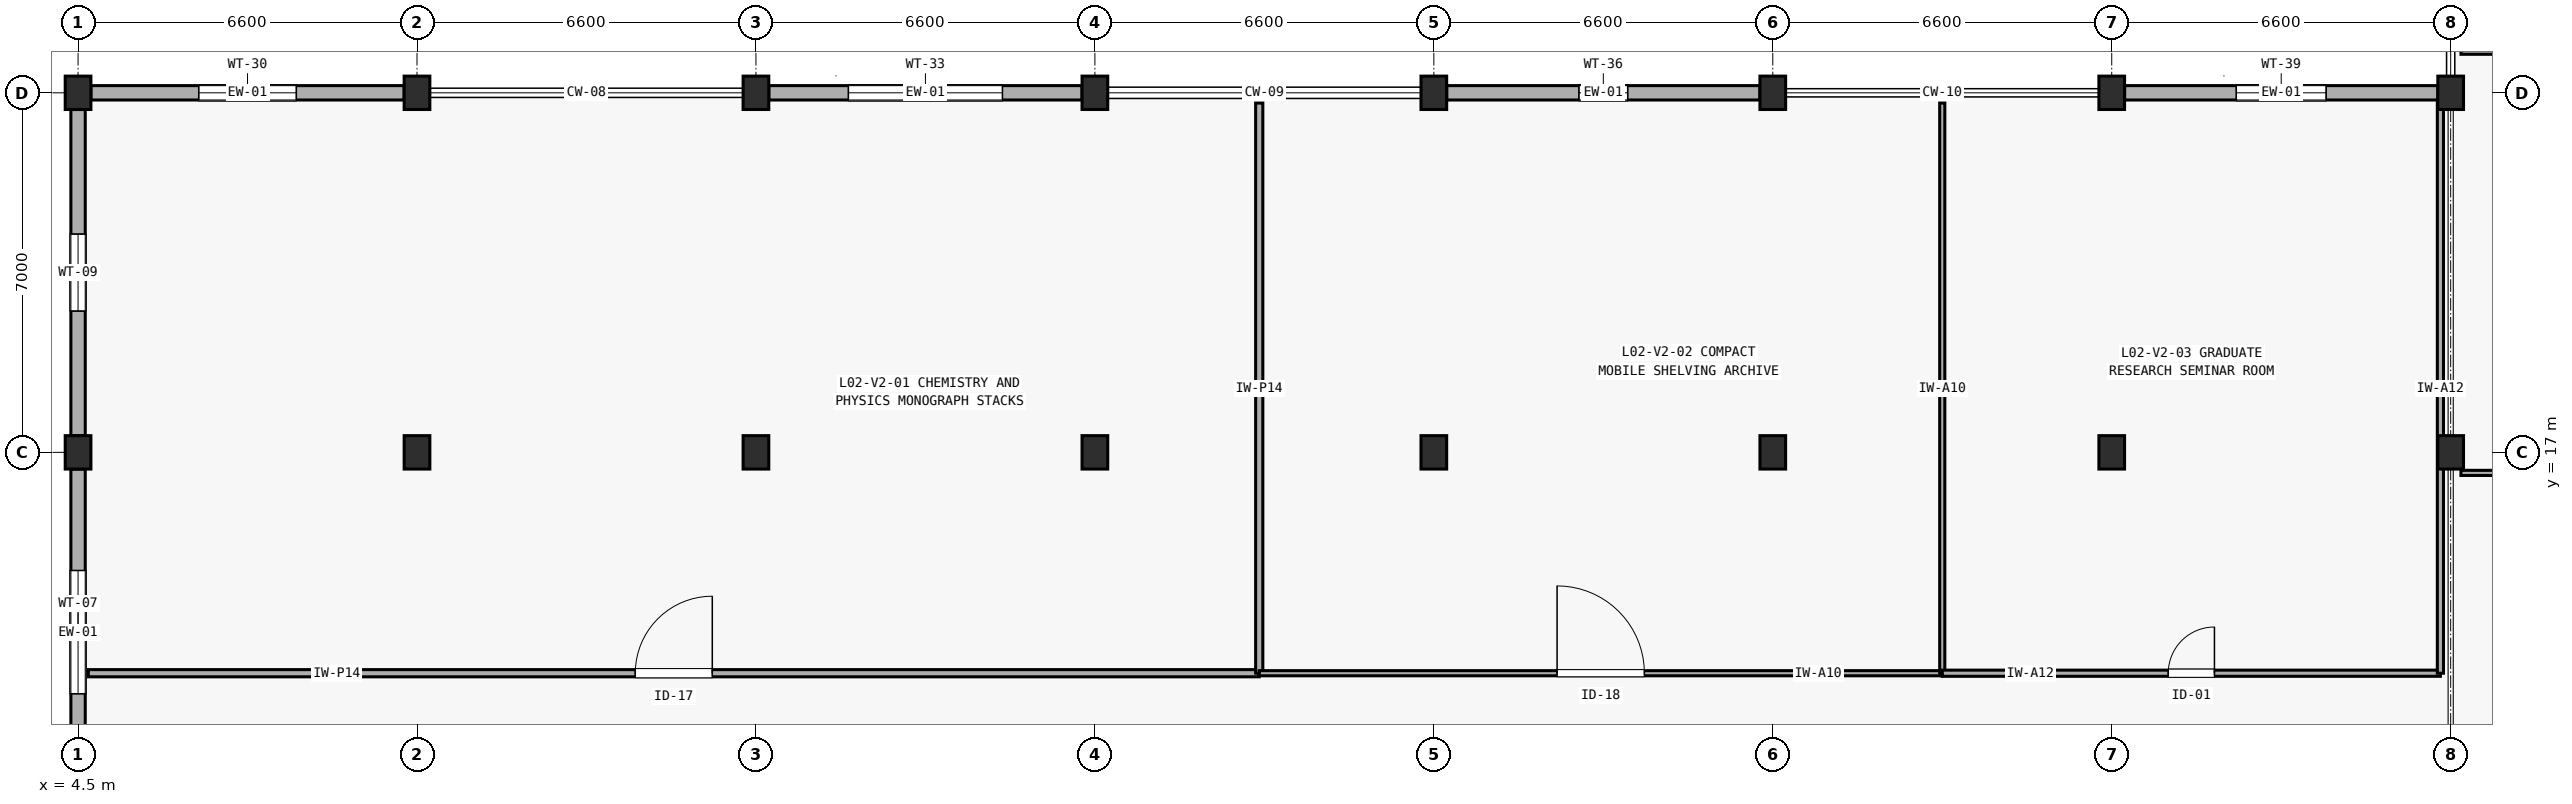
"""IFC4 building model, lengths in metres.
Left out: names, types, materials, properties, quantities, classifications, styles, units other than length and angle.
Written with IfcOpenShell. Run it as: python <this file> out.ifc"""

import sys

from ifc_helpers import new_model, si_unit, direction, frame, frame_2d, origin, origin_2d, place, context, subcontext, project, spatial, rectangle, extrude, element, fill, save


model = new_model("IFC4")
c1 = context("Model", 3, precision=1e-05, world=origin(), true_north=direction((0.0, 1.0)))
c2 = subcontext(c1, "Body", "Model", "MODEL_VIEW")
j1 = project(units=[si_unit("LENGTHUNIT", "METRE"), si_unit("PLANEANGLEUNIT", "RADIAN")], contexts=[c1])
p1 = place(None, origin())
s1 = spatial("IfcSite", under=j1, at=p1, CompositionType="ELEMENT")
p2 = place(p1, origin())
s2 = spatial("IfcBuilding", under=s1, at=p2, CompositionType="ELEMENT")
p3 = place(p2, frame((0.0, 0.0, 8.4)))
s3 = spatial("IfcBuildingStorey", under=s2, at=p3, CompositionType="ELEMENT", Elevation=8.4)
for number, where, z_axis, x_axis in (
    (1, (4.5, 17.0, 0.0), (0.0, 0.0, 1.0), (1.0, 0.0, 0.0)),
    (2, (4.5, 24.0, 0.0), (0.0, 0.0, 1.0), (1.0, 0.0, 0.0)),
    (3, (11.1, 17.0, 0.0), (0.0, 0.0, 1.0), (1.0, 0.0, 0.0)),
    (4, (11.1, 24.0, 0.0), (0.0, 0.0, 1.0), (1.0, 0.0, 0.0)),
    (5, (17.7, 17.0, 0.0), (0.0, 0.0, 1.0), (1.0, 0.0, 0.0)),
    (6, (17.7, 24.0, 0.0), (0.0, 0.0, 1.0), (1.0, 0.0, 0.0)),
    (7, (24.3, 17.0, 0.0), (0.0, 0.0, 1.0), (1.0, 0.0, 0.0)),
    (8, (24.3, 24.0, 0.0), (0.0, 0.0, 1.0), (1.0, 0.0, 0.0)),
    (9, (30.9, 17.0, 0.0), (0.0, 0.0, 1.0), (1.0, 0.0, 0.0)),
    (10, (30.9, 24.0, 0.0), (0.0, 0.0, 1.0), (1.0, 0.0, 0.0)),
    (11, (37.5, 17.0, 0.0), (0.0, 0.0, 1.0), (1.0, 0.0, 0.0)),
    (12, (37.5, 24.0, 0.0), (0.0, 0.0, 1.0), (1.0, 0.0, 0.0)),
    (13, (44.1, 17.0, 0.0), (0.0, 0.0, 1.0), (1.0, 0.0, 0.0)),
    (14, (44.1, 24.0, 0.0), (0.0, 0.0, 1.0), (1.0, 0.0, 0.0)),
    (15, (50.7, 17.0, 0.0), (0.0, 0.0, 1.0), (1.0, 0.0, 0.0)),
    (16, (50.7, 24.0, 0.0), (0.0, 0.0, 1.0), (1.0, 0.0, 0.0)),
):
    element("IfcColumn", number, at=place(p3, frame(where, z_axis=z_axis, x_axis=x_axis)), inside=s3, PredefinedType="COLUMN", context=c2, shape_type="SweptSolid", body=[
        extrude(rectangle(XDim=0.5, YDim=0.65, at=origin_2d()), origin(), (0.0, 0.0, 1.0), 4.2),
    ])
p4 = place(p3, frame((4.75, 24.0, 0.0), z_axis=(0.0, 0.0, 1.0), x_axis=(1.0, 0.0, 0.0)))
e17 = element("IfcWall", 17, at=p4, inside=s3, PredefinedType="SOLIDWALL", context=c2, shape_type="SweptSolid", body=[
    extrude(rectangle(XDim=6.1, YDim=0.28, at=frame_2d((3.05, 0.0))), origin(), (0.0, 0.0, 1.0), 3.235),
])
p5 = place(p4, frame((2.1, 0.0, 0.85)))
e18 = element("IfcOpeningElement", 18, at=p5, cuts=e17, PredefinedType="OPENING", context=c2, shape_type="SweptSolid", body=[
    extrude(rectangle(XDim=1.9, YDim=1.45, at=frame_2d((0.95, 0.725))), frame((0.0, 0.15, 0.0), z_axis=(0.0, -1.0, 0.0), x_axis=(1.0, 0.0, 0.0)), (0.0, 0.0, 1.0), 0.3),
])
p6 = place(p3, frame((17.95, 24.0, 0.0), z_axis=(0.0, 0.0, 1.0), x_axis=(1.0, 0.0, 0.0)))
e19 = element("IfcWall", 19, at=p6, inside=s3, PredefinedType="SOLIDWALL", context=c2, shape_type="SweptSolid", body=[
    extrude(rectangle(XDim=6.1, YDim=0.28, at=frame_2d((3.05, 0.0))), origin(), (0.0, 0.0, 1.0), 3.365),
])
p7 = place(p6, frame((1.55, 0.0, 0.85)))
e20 = element("IfcOpeningElement", 20, at=p7, cuts=e19, PredefinedType="OPENING", context=c2, shape_type="SweptSolid", body=[
    extrude(rectangle(XDim=3.0, YDim=1.2, at=frame_2d((1.5, 0.6))), frame((0.0, 0.15, 0.0), z_axis=(0.0, -1.0, 0.0), x_axis=(1.0, 0.0, 0.0)), (0.0, 0.0, 1.0), 0.3),
])
p8 = place(p3, frame((31.15, 24.0, 0.0), z_axis=(0.0, 0.0, 1.0), x_axis=(1.0, 0.0, 0.0)))
e21 = element("IfcWall", 21, at=p8, inside=s3, PredefinedType="SOLIDWALL", context=c2, shape_type="SweptSolid", body=[
    extrude(rectangle(XDim=6.1, YDim=0.28, at=frame_2d((3.05, 0.0))), origin(), (0.0, 0.0, 1.0), 3.385),
])
p9 = place(p8, frame((2.575, 0.0, 0.85)))
e22 = element("IfcOpeningElement", 22, at=p9, cuts=e21, PredefinedType="OPENING", context=c2, shape_type="SweptSolid", body=[
    extrude(rectangle(XDim=0.95, YDim=1.55, at=frame_2d((0.475, 0.775))), frame((0.0, 0.15, 0.0), z_axis=(0.0, -1.0, 0.0), x_axis=(1.0, 0.0, 0.0)), (0.0, 0.0, 1.0), 0.3),
])
p10 = place(p3, frame((44.35, 24.0, 0.0), z_axis=(0.0, 0.0, 1.0), x_axis=(1.0, 0.0, 0.0)))
e23 = element("IfcWall", 23, at=p10, inside=s3, PredefinedType="SOLIDWALL", context=c2, shape_type="SweptSolid", body=[
    extrude(rectangle(XDim=6.1, YDim=0.28, at=frame_2d((3.05, 0.0))), origin(), (0.0, 0.0, 1.0), 3.345),
])
p11 = place(p10, frame((2.175, 0.0, 0.85)))
e24 = element("IfcOpeningElement", 24, at=p11, cuts=e23, PredefinedType="OPENING", context=c2, shape_type="SweptSolid", body=[
    extrude(rectangle(XDim=1.75, YDim=1.55, at=frame_2d((0.875, 0.775))), frame((0.0, 0.15, 0.0), z_axis=(0.0, -1.0, 0.0), x_axis=(1.0, 0.0, 0.0)), (0.0, 0.0, 1.0), 0.3),
])
p12 = place(p3, frame((4.5, 10.325, 0.0), z_axis=(0.0, 0.0, 1.0), x_axis=(0.0, 1.0, 0.0)))
e25 = element("IfcWall", 25, at=p12, inside=s3, PredefinedType="SOLIDWALL", context=c2, shape_type="SweptSolid", body=[
    extrude(rectangle(XDim=6.35, YDim=0.28, at=frame_2d((3.175, 0.0))), origin(), (0.0, 0.0, 1.0), 3.505),
])
p13 = place(p12, frame((1.975, 0.0, 0.85)))
e26 = element("IfcOpeningElement", 26, at=p13, cuts=e25, PredefinedType="OPENING", context=c2, shape_type="SweptSolid", body=[
    extrude(rectangle(XDim=2.4, YDim=1.35, at=frame_2d((1.2, 0.675))), frame((0.0, 0.15, 0.0), z_axis=(0.0, -1.0, 0.0), x_axis=(1.0, 0.0, 0.0)), (0.0, 0.0, 1.0), 0.3),
])
p14 = place(p3, frame((4.5, 17.325, 0.0), z_axis=(0.0, 0.0, 1.0), x_axis=(0.0, 1.0, 0.0)))
e27 = element("IfcWall", 27, at=p14, inside=s3, PredefinedType="SOLIDWALL", context=c2, shape_type="SweptSolid", body=[
    extrude(rectangle(XDim=6.35, YDim=0.28, at=frame_2d((3.175, 0.0))), origin(), (0.0, 0.0, 1.0), 3.505),
])
p15 = place(p14, frame((2.425, 0.0, 0.85)))
e28 = element("IfcOpeningElement", 28, at=p15, cuts=e27, PredefinedType="OPENING", context=c2, shape_type="SweptSolid", body=[
    extrude(rectangle(XDim=1.5, YDim=1.5, at=frame_2d((0.75, 0.75))), frame((0.0, 0.15, 0.0), z_axis=(0.0, -1.0, 0.0), x_axis=(1.0, 0.0, 0.0)), (0.0, 0.0, 1.0), 0.3),
])
p16 = place(p3, frame((4.7, 12.7, 0.0), z_axis=(0.0, 0.0, 1.0), x_axis=(1.0, 0.0, 0.0)))
e29 = element("IfcWall", 29, at=p16, inside=s3, PredefinedType="PLUMBINGWALL", context=c2, shape_type="SweptSolid", body=[
    extrude(rectangle(XDim=22.8, YDim=0.14, at=frame_2d((11.4, 0.0))), origin(), (0.0, 0.0, 1.0), 3.9),
])
p17 = place(p16, frame((10.65, 0.0, 0.0)))
e30 = element("IfcOpeningElement", 30, at=p17, cuts=e29, PredefinedType="OPENING", context=c2, shape_type="SweptSolid", body=[
    extrude(rectangle(XDim=1.5, YDim=2.15, at=frame_2d((0.75, 1.075))), frame((0.0, 0.08, 0.0), z_axis=(0.0, -1.0, 0.0), x_axis=(1.0, 0.0, 0.0)), (0.0, 0.0, 1.0), 0.16),
])
p18 = place(p3, frame((27.5, 12.7, 0.0), z_axis=(0.0, 0.0, 1.0), x_axis=(0.0, 1.0, 0.0)))
e31 = element("IfcWall", 31, at=p18, inside=s3, PredefinedType="PLUMBINGWALL", context=c2, shape_type="SweptSolid", body=[
    extrude(rectangle(XDim=11.1, YDim=0.14, at=frame_2d((5.55, 0.0))), origin(), (0.0, 0.0, 1.0), 3.521),
])
p19 = place(p3, frame((27.5, 12.7, 0.0), z_axis=(0.0, 0.0, 1.0), x_axis=(1.0, 0.0, 0.0)))
e32 = element("IfcWall", 32, at=p19, inside=s3, PredefinedType="PARTITIONING", context=c2, shape_type="SweptSolid", body=[
    extrude(rectangle(XDim=13.3, YDim=0.1, at=frame_2d((6.65, 0.0))), origin(), (0.0, 0.0, 1.0), 3.9),
])
p20 = place(p19, frame((5.8, 0.0, 0.0)))
e33 = element("IfcOpeningElement", 33, at=p20, cuts=e32, PredefinedType="OPENING", context=c2, shape_type="SweptSolid", body=[
    extrude(rectangle(XDim=1.7, YDim=2.2, at=frame_2d((0.85, 1.1))), frame((0.0, 0.06, 0.0), z_axis=(0.0, -1.0, 0.0), x_axis=(1.0, 0.0, 0.0)), (0.0, 0.0, 1.0), 0.12),
])
p21 = place(p3, frame((40.8, 12.7, 0.0), z_axis=(0.0, 0.0, 1.0), x_axis=(0.0, 1.0, 0.0)))
e34 = element("IfcWall", 34, at=p21, inside=s3, PredefinedType="PARTITIONING", context=c2, shape_type="SweptSolid", body=[
    extrude(rectangle(XDim=11.1, YDim=0.1, at=frame_2d((5.55, 0.0))), origin(), (0.0, 0.0, 1.0), 3.458),
])
p22 = place(p3, frame((40.8, 12.7, 0.0), z_axis=(0.0, 0.0, 1.0), x_axis=(1.0, 0.0, 0.0)))
e35 = element("IfcWall", 35, at=p22, inside=s3, PredefinedType="PARTITIONING", context=c2, shape_type="SweptSolid", body=[
    extrude(rectangle(XDim=9.7, YDim=0.12, at=frame_2d((4.85, 0.0))), origin(), (0.0, 0.0, 1.0), 3.9),
])
p23 = place(p22, frame((4.4, 0.0, 0.0)))
e36 = element("IfcOpeningElement", 36, at=p23, cuts=e35, PredefinedType="OPENING", context=c2, shape_type="SweptSolid", body=[
    extrude(rectangle(XDim=0.9, YDim=2.1, at=frame_2d((0.45, 1.05))), frame((0.0, 0.07, 0.0), z_axis=(0.0, -1.0, 0.0), x_axis=(1.0, 0.0, 0.0)), (0.0, 0.0, 1.0), 0.14),
])
p24 = place(p3, frame((50.5, 12.7, 0.0), z_axis=(0.0, 0.0, 1.0), x_axis=(0.0, 1.0, 0.0)))
e37 = element("IfcWall", 37, at=p24, inside=s3, PredefinedType="PARTITIONING", context=c2, shape_type="SweptSolid", body=[
    extrude(rectangle(XDim=11.1, YDim=0.12, at=frame_2d((5.55, 0.0))), origin(), (0.0, 0.0, 1.0), 3.485),
])
p25 = place(p3, frame((50.9, 16.6, 0.0), z_axis=(0.0, 0.0, 1.0), x_axis=(1.0, 0.0, 0.0)))
e38 = element("IfcWall", 38, at=p25, inside=s3, PredefinedType="PARTITIONING", context=c2, shape_type="SweptSolid", body=[
    extrude(rectangle(XDim=16.6, YDim=0.1, at=frame_2d((8.3, 0.0))), origin(), (0.0, 0.0, 1.0), 3.135),
])
p26 = place(p3, frame((50.9, 24.8, 0.0), z_axis=(0.0, 0.0, 1.0), x_axis=(1.0, 0.0, 0.0)))
e39 = element("IfcWall", 39, at=p26, inside=s3, PredefinedType="PARTITIONING", context=c2, shape_type="SweptSolid", body=[
    extrude(rectangle(XDim=16.6, YDim=0.1, at=frame_2d((8.3, 0.0))), origin(), (0.0, 0.0, 1.0), 3.9),
])
p27 = place(p26, frame((7.8, 0.0, 0.0)))
e40 = element("IfcOpeningElement", 40, at=p27, cuts=e39, PredefinedType="OPENING", context=c2, shape_type="SweptSolid", body=[
    extrude(rectangle(XDim=1.0, YDim=2.1, at=frame_2d((0.5, 1.05))), frame((0.0, 0.06, 0.0), z_axis=(0.0, -1.0, 0.0), x_axis=(1.0, 0.0, 0.0)), (0.0, 0.0, 1.0), 0.12),
])
p28 = place(p5, origin())
e41 = element("IfcWindow", 41, at=p28, inside=s3, PartitioningType="SINGLE_PANEL", PredefinedType="WINDOW", context=c2, shape_type="SweptSolid", body=[
    extrude(rectangle(XDim=1.9, YDim=1.45, at=frame_2d((0.95, 0.725))), frame((0.0, 0.03, 0.0), z_axis=(0.0, -1.0, 0.0), x_axis=(1.0, 0.0, 0.0)), (0.0, 0.0, 1.0), 0.06),
])
fill(e18, e41)
p29 = place(p7, origin())
e42 = element("IfcWindow", 42, at=p29, inside=s3, PartitioningType="SINGLE_PANEL", PredefinedType="WINDOW", context=c2, shape_type="SweptSolid", body=[
    extrude(rectangle(XDim=3.0, YDim=1.2, at=frame_2d((1.5, 0.6))), frame((0.0, 0.03, 0.0), z_axis=(0.0, -1.0, 0.0), x_axis=(1.0, 0.0, 0.0)), (0.0, 0.0, 1.0), 0.06),
])
fill(e20, e42)
p30 = place(p9, origin())
e43 = element("IfcWindow", 43, at=p30, inside=s3, PartitioningType="SINGLE_PANEL", PredefinedType="WINDOW", context=c2, shape_type="SweptSolid", body=[
    extrude(rectangle(XDim=0.95, YDim=1.55, at=frame_2d((0.475, 0.775))), frame((0.0, 0.03, 0.0), z_axis=(0.0, -1.0, 0.0), x_axis=(1.0, 0.0, 0.0)), (0.0, 0.0, 1.0), 0.06),
])
fill(e22, e43)
p31 = place(p11, origin())
e44 = element("IfcWindow", 44, at=p31, inside=s3, PartitioningType="SINGLE_PANEL", PredefinedType="WINDOW", context=c2, shape_type="SweptSolid", body=[
    extrude(rectangle(XDim=1.75, YDim=1.55, at=frame_2d((0.875, 0.775))), frame((0.0, 0.03, 0.0), z_axis=(0.0, -1.0, 0.0), x_axis=(1.0, 0.0, 0.0)), (0.0, 0.0, 1.0), 0.06),
])
fill(e24, e44)
p32 = place(p13, origin())
e45 = element("IfcWindow", 45, at=p32, inside=s3, PartitioningType="SINGLE_PANEL", PredefinedType="WINDOW", context=c2, shape_type="SweptSolid", body=[
    extrude(rectangle(XDim=2.4, YDim=1.35, at=frame_2d((1.2, 0.675))), frame((0.0, 0.03, 0.0), z_axis=(0.0, -1.0, 0.0), x_axis=(1.0, 0.0, 0.0)), (0.0, 0.0, 1.0), 0.06),
])
fill(e26, e45)
p33 = place(p15, origin())
e46 = element("IfcWindow", 46, at=p33, inside=s3, PartitioningType="SINGLE_PANEL", PredefinedType="WINDOW", context=c2, shape_type="SweptSolid", body=[
    extrude(rectangle(XDim=1.5, YDim=1.5, at=frame_2d((0.75, 0.75))), frame((0.0, 0.03, 0.0), z_axis=(0.0, -1.0, 0.0), x_axis=(1.0, 0.0, 0.0)), (0.0, 0.0, 1.0), 0.06),
])
fill(e28, e46)
p34 = place(p17, origin())
e47 = element("IfcDoor", 47, at=p34, inside=s3, OperationType="SINGLE_SWING_RIGHT", PredefinedType="DOOR", context=c2, shape_type="SweptSolid", body=[
    extrude(rectangle(XDim=1.5, YDim=2.15, at=frame_2d((0.75, 1.075))), frame((0.0, 0.025, 0.0), z_axis=(0.0, -1.0, 0.0), x_axis=(1.0, 0.0, 0.0)), (0.0, 0.0, 1.0), 0.05),
])
fill(e30, e47)
p35 = place(p20, origin())
e48 = element("IfcDoor", 48, at=p35, inside=s3, OperationType="SINGLE_SWING_LEFT", PredefinedType="DOOR", context=c2, shape_type="SweptSolid", body=[
    extrude(rectangle(XDim=1.7, YDim=2.2, at=frame_2d((0.85, 1.1))), frame((0.0, 0.025, 0.0), z_axis=(0.0, -1.0, 0.0), x_axis=(1.0, 0.0, 0.0)), (0.0, 0.0, 1.0), 0.05),
])
fill(e33, e48)
p36 = place(p23, origin())
e49 = element("IfcDoor", 49, at=p36, inside=s3, OperationType="SINGLE_SWING_RIGHT", PredefinedType="DOOR", context=c2, shape_type="SweptSolid", body=[
    extrude(rectangle(XDim=0.9, YDim=2.1, at=frame_2d((0.45, 1.05))), frame((0.0, 0.025, 0.0), z_axis=(0.0, -1.0, 0.0), x_axis=(1.0, 0.0, 0.0)), (0.0, 0.0, 1.0), 0.05),
])
fill(e36, e49)
save(model, sys.argv[1])
